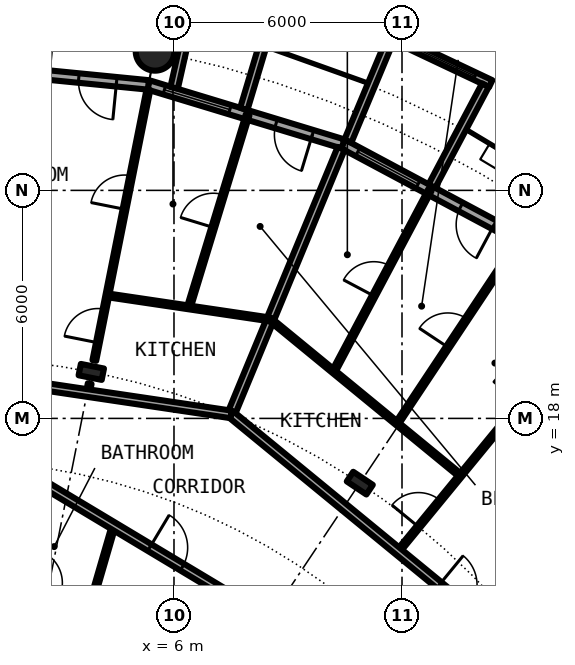
"""IFC4 building model, lengths in metres.
Left out: names, types, materials, properties, quantities, classifications, styles, units other than length and angle.
Written with IfcOpenShell. Run it as: python <this file> out.ifc"""

import sys

from ifc_helpers import new_model, si_unit, direction, frame, frame_2d, origin, origin_2d, place, context, subcontext, project, spatial, rectangle, circle, hollow_circle, i_section, extrude, element, fill, save


model = new_model("IFC4")
c1 = context("Model", 3, precision=1e-05, world=origin(), true_north=direction((0.0, 1.0)))
c2 = subcontext(c1, "Body", "Model", "MODEL_VIEW")
j1 = project(units=[si_unit("LENGTHUNIT", "METRE"), si_unit("PLANEANGLEUNIT", "RADIAN")], contexts=[c1])
p1 = place(None, origin())
s1 = spatial("IfcSite", under=j1, at=p1, CompositionType="ELEMENT")
p2 = place(p1, origin())
s2 = spatial("IfcBuilding", under=s1, at=p2, CompositionType="ELEMENT")
p3 = place(p2, frame((0.0, 0.0, 50.25)))
s3 = spatial("IfcBuildingStorey", under=s2, at=p3, CompositionType="ELEMENT", Elevation=50.25)
p4 = place(p3, frame((5.501, 27.658, 0.0), z_axis=(0.0, 0.0, 1.0), x_axis=(1.0, 0.0, 0.0)))
e1 = element("IfcColumn", 1, at=p4, inside=s3, PredefinedType="COLUMN", context=c2, shape_type="SweptSolid", body=[
    extrude(hollow_circle(Radius=0.508, WallThickness=0.05, at=origin_2d()), origin(), (0.0, 0.0, 1.0), 3.05),
])
for number, where, z_axis, x_axis in (
    (2, (10.889, 16.297, 0.0), (0.0, 0.0, 1.0), (0.556, 0.831, 0.0)),
    (3, (3.824, 19.223, 0.0), (0.0, 0.0, 1.0), (0.195, 0.981, 0.0)),
):
    element("IfcColumn", number, at=place(p3, frame(where, z_axis=z_axis, x_axis=x_axis)), inside=s3, PredefinedType="COLUMN", context=c2, shape_type="SweptSolid", body=[
        extrude(i_section(OverallWidth=0.305, OverallDepth=0.62, WebThickness=0.021, FlangeThickness=0.04, FilletRadius=0.027, at=origin_2d()), origin(), (0.0, 0.0, 1.0), 3.05),
    ])
p5 = place(p3, frame((15.167, 22.699, 0.0), z_axis=(0.0, 0.0, 1.0), x_axis=(-0.881915646801, 0.471407246368, 0.0)))
e4 = element("IfcWall", 4, at=p5, inside=s3, PredefinedType="SOLIDWALL", context=c2, shape_type="SweptSolid", body=[
    extrude(rectangle(XDim=5.352, YDim=0.25, at=frame_2d((2.676, 0.0))), origin(), (0.0, 0.0, 1.0), 2.7),
])
p6 = place(p5, frame((0.841, 0.0, 0.0)))
e5 = element("IfcOpeningElement", 5, at=p6, cuts=e4, PredefinedType="OPENING", context=c2, shape_type="SweptSolid", body=[
    extrude(rectangle(XDim=1.0, YDim=2.2, at=frame_2d((0.5, 1.1))), frame((0.0, 0.135, 0.0), z_axis=(0.0, -1.0, 0.0), x_axis=(1.0, 0.0, 0.0)), (0.0, 0.0, 1.0), 0.27),
])
p7 = place(p5, frame((3.111, 0.0, 0.3)))
e6 = element("IfcOpeningElement", 6, at=p7, cuts=e4, PredefinedType="OPENING", context=c2, shape_type="SweptSolid", body=[
    extrude(rectangle(XDim=1.8, YDim=2.1, at=frame_2d((0.9, 1.05))), frame((0.0, 0.135, 0.0), z_axis=(0.0, -1.0, 0.0), x_axis=(1.0, 0.0, 0.0)), (0.0, 0.0, 1.0), 0.27),
])
p8 = place(p3, frame((14.335, 26.808, -0.03), z_axis=(0.0, 0.0, 1.0), x_axis=(-0.904000060331, 0.427532327342, 0.0)))
e7 = element("IfcWall", 7, at=p8, inside=s3, PredefinedType="SOLIDWALL", context=c2, shape_type="SweptSolid", body=[
    extrude(rectangle(XDim=2.993, YDim=0.2, at=frame_2d((1.497, 0.0))), origin(), (0.0, 0.0, 1.0), 2.73),
])
p9 = place(p8, frame((0.457, 0.0, 0.33)))
e8 = element("IfcOpeningElement", 8, at=p9, cuts=e7, PredefinedType="OPENING", context=c2, shape_type="SweptSolid", body=[
    extrude(circle(Radius=1.04, at=frame_2d((1.04, 1.04))), frame((0.0, 0.11, 0.0), z_axis=(0.0, -1.0, 0.0), x_axis=(1.0, 0.0, 0.0)), (0.0, 0.0, 1.0), 0.22),
])
p10 = place(p3, frame((12.787, 24.113, -0.03), z_axis=(0.0, 0.0, 1.0), x_axis=(0.468365282436, 0.883534924159, 0.0)))
e9 = element("IfcWall", 9, at=p10, inside=s3, PredefinedType="SOLIDWALL", context=c2, shape_type="SweptSolid", body=[
    extrude(rectangle(XDim=3.006, YDim=0.2, at=frame_2d((1.503, 0.0))), origin(), (0.0, 0.0, 1.0), 2.73),
])
p11 = place(p3, frame((10.575, 25.295, -0.03), z_axis=(0.0, 0.0, 1.0), x_axis=(0.385697364644, 0.922625353492, 0.0)))
e10 = element("IfcWall", 10, at=p11, inside=s3, PredefinedType="SOLIDWALL", context=c2, shape_type="SweptSolid", body=[
    extrude(rectangle(XDim=2.883, YDim=0.2, at=frame_2d((1.442, 0.0))), origin(), (0.0, 0.0, 1.0), 2.73),
])
p12 = place(p3, frame((10.447, 25.222, 0.0), z_axis=(0.0, 0.0, 1.0), x_axis=(-0.956965678721, 0.290201119486, 0.0)))
e11 = element("IfcWall", 11, at=p12, inside=s3, PredefinedType="SOLIDWALL", context=c2, shape_type="SweptSolid", body=[
    extrude(rectangle(XDim=5.351, YDim=0.25, at=frame_2d((2.676, 0.0))), origin(), (0.0, 0.0, 1.0), 2.7),
])
p13 = place(p12, frame((0.841, 0.0, 0.0)))
e12 = element("IfcOpeningElement", 12, at=p13, cuts=e11, PredefinedType="OPENING", context=c2, shape_type="SweptSolid", body=[
    extrude(rectangle(XDim=1.0, YDim=2.2, at=frame_2d((0.5, 1.1))), frame((0.0, 0.135, 0.0), z_axis=(0.0, -1.0, 0.0), x_axis=(1.0, 0.0, 0.0)), (0.0, 0.0, 1.0), 0.27),
])
p14 = place(p12, frame((3.111, 0.0, 0.3)))
e13 = element("IfcOpeningElement", 13, at=p14, cuts=e11, PredefinedType="OPENING", context=c2, shape_type="SweptSolid", body=[
    extrude(rectangle(XDim=1.8, YDim=2.1, at=frame_2d((0.9, 1.05))), frame((0.0, 0.135, 0.0), z_axis=(0.0, -1.0, 0.0), x_axis=(1.0, 0.0, 0.0)), (0.0, 0.0, 1.0), 0.27),
])
p15 = place(p3, frame((7.837, 26.144, -0.03), z_axis=(0.0, 0.0, 1.0), x_axis=(0.287064767992, 0.957911174889, 0.0)))
e14 = element("IfcWall", 14, at=p15, inside=s3, PredefinedType="SOLIDWALL", context=c2, shape_type="SweptSolid", body=[
    extrude(rectangle(XDim=3.006, YDim=0.2, at=frame_2d((1.503, 0.0))), origin(), (0.0, 0.0, 1.0), 2.73),
])
p16 = place(p3, frame((6.004, 26.7, -0.03), z_axis=(0.0, 0.0, 1.0), x_axis=(0.219609259383, 0.975587911566, 0.0)))
e15 = element("IfcWall", 15, at=p16, inside=s3, PredefinedType="SOLIDWALL", context=c2, shape_type="SweptSolid", body=[
    extrude(rectangle(XDim=2.933, YDim=0.2, at=frame_2d((1.466, 0.0))), origin(), (0.0, 0.0, 1.0), 2.73),
])
p17 = place(p3, frame((5.326, 26.775, 0.0), z_axis=(0.0, 0.0, 1.0), x_axis=(-0.995173996315, 0.098126026407, 0.0)))
e16 = element("IfcWall", 16, at=p17, inside=s3, PredefinedType="SOLIDWALL", context=c2, shape_type="SweptSolid", body=[
    extrude(rectangle(XDim=5.352, YDim=0.25, at=frame_2d((2.676, 0.0))), origin(), (0.0, 0.0, 1.0), 2.7),
])
p18 = place(p17, frame((0.841, 0.0, 0.0)))
e17 = element("IfcOpeningElement", 17, at=p18, cuts=e16, PredefinedType="OPENING", context=c2, shape_type="SweptSolid", body=[
    extrude(rectangle(XDim=1.0, YDim=2.2, at=frame_2d((0.5, 1.1))), frame((0.0, 0.135, 0.0), z_axis=(0.0, -1.0, 0.0), x_axis=(1.0, 0.0, 0.0)), (0.0, 0.0, 1.0), 0.27),
])
p19 = place(p17, frame((3.111, 0.0, 0.3)))
e18 = element("IfcOpeningElement", 18, at=p19, cuts=e16, PredefinedType="OPENING", context=c2, shape_type="SweptSolid", body=[
    extrude(rectangle(XDim=1.8, YDim=2.1, at=frame_2d((0.9, 1.05))), frame((0.0, 0.135, 0.0), z_axis=(0.0, -1.0, 0.0), x_axis=(1.0, 0.0, 0.0)), (0.0, 0.0, 1.0), 0.27),
])
p20 = place(p3, frame((2.586, 27.171, -0.03), z_axis=(0.0, 0.0, 1.0), x_axis=(0.094548432284, 0.995520262954, 0.0)))
e19 = element("IfcWall", 19, at=p20, inside=s3, PredefinedType="SOLIDWALL", context=c2, shape_type="SweptSolid", body=[
    extrude(rectangle(XDim=3.006, YDim=0.2, at=frame_2d((1.503, 0.0))), origin(), (0.0, 0.0, 1.0), 2.73),
])
p21 = place(p3, frame((3.706, 12.744, 0.0), z_axis=(0.0, 0.0, 1.0), x_axis=(0.279201466266, 0.960232545395, 0.0)))
e20 = element("IfcWall", 20, at=p21, inside=s3, PredefinedType="PARTITIONING", context=c2, shape_type="SweptSolid", body=[
    extrude(rectangle(XDim=2.524, YDim=0.1, at=frame_2d((1.262, 0.0))), origin(), (0.0, 0.0, 1.0), 2.7),
])
p22 = place(p3, frame((3.733, 18.667, 0.0), z_axis=(0.0, 0.0, 1.0), x_axis=(0.193340656307, 0.981131688724, 0.0)))
e21 = element("IfcWall", 21, at=p22, inside=s3, PredefinedType="PARTITIONING", context=c2, shape_type="SweptSolid", body=[
    extrude(rectangle(XDim=0.254, YDim=0.1, at=frame_2d((0.127, 0.0))), origin(), (0.0, 0.0, 1.0), 2.7),
])
p23 = place(p3, frame((3.904, 19.524, 0.0), z_axis=(0.0, 0.0, 1.0), x_axis=(0.195857618189, 0.980632343642, 0.0)))
e22 = element("IfcWall", 22, at=p23, inside=s3, PredefinedType="PARTITIONING", context=c2, shape_type="SweptSolid", body=[
    extrude(rectangle(XDim=7.265, YDim=0.1, at=frame_2d((3.632, 0.0))), origin(), (0.0, 0.0, 1.0), 2.7),
])
p24 = place(p23, frame((0.476, 0.0, 0.0)))
e23 = element("IfcOpeningElement", 23, at=p24, cuts=e22, PredefinedType="OPENING", context=c2, shape_type="SweptSolid", body=[
    extrude(rectangle(XDim=0.9, YDim=2.3, at=frame_2d((0.45, 1.15))), frame((0.0, 0.06, 0.0), z_axis=(0.0, -1.0, 0.0), x_axis=(1.0, 0.0, 0.0)), (0.0, 0.0, 1.0), 0.12),
])
p25 = place(p23, frame((4.058, 0.0, 0.0)))
e24 = element("IfcOpeningElement", 24, at=p25, cuts=e22, PredefinedType="OPENING", context=c2, shape_type="SweptSolid", body=[
    extrude(rectangle(XDim=0.9, YDim=2.3, at=frame_2d((0.45, 1.15))), frame((0.0, 0.06, 0.0), z_axis=(0.0, -1.0, 0.0), x_axis=(1.0, 0.0, 0.0)), (0.0, 0.0, 1.0), 0.12),
])
p26 = place(p3, frame((6.39, 20.921, 0.0), z_axis=(0.0, 0.0, 1.0), x_axis=(0.292081613207, 0.956393397732, 0.0)))
e25 = element("IfcWall", 25, at=p26, inside=s3, PredefinedType="PARTITIONING", context=c2, shape_type="SweptSolid", body=[
    extrude(rectangle(XDim=5.3, YDim=0.1, at=frame_2d((2.65, 0.0))), origin(), (0.0, 0.0, 1.0), 2.7),
])
p27 = place(p26, frame((2.2, 0.0, 0.0)))
e26 = element("IfcOpeningElement", 26, at=p27, cuts=e25, PredefinedType="OPENING", context=c2, shape_type="SweptSolid", body=[
    extrude(rectangle(XDim=0.9, YDim=2.3, at=frame_2d((0.45, 1.15))), frame((0.0, 0.06, 0.0), z_axis=(0.0, -1.0, 0.0), x_axis=(1.0, 0.0, 0.0)), (0.0, 0.0, 1.0), 0.12),
])
p28 = place(p3, frame((7.501, 18.108, 0.0), z_axis=(0.0, 0.0, 1.0), x_axis=(0.382600411313, 0.923913916587, 0.0)))
e27 = element("IfcWall", 27, at=p28, inside=s3, PredefinedType="PARTITIONING", context=c2, shape_type="SweptSolid", body=[
    extrude(rectangle(XDim=7.574, YDim=0.2, at=frame_2d((3.787, 0.0))), origin(), (0.0, 0.0, 1.0), 2.7),
])
p29 = place(p3, frame((10.202, 19.234, 0.0), z_axis=(0.0, 0.0, 1.0), x_axis=(0.468610030042, 0.883405139075, 0.0)))
e28 = element("IfcWall", 28, at=p29, inside=s3, PredefinedType="PARTITIONING", context=c2, shape_type="SweptSolid", body=[
    extrude(rectangle(XDim=5.403, YDim=0.1, at=frame_2d((2.702, 0.0))), origin(), (0.0, 0.0, 1.0), 2.7),
])
p30 = place(p29, frame((2.252, 0.0, 0.0)))
e29 = element("IfcOpeningElement", 29, at=p30, cuts=e28, PredefinedType="OPENING", context=c2, shape_type="SweptSolid", body=[
    extrude(rectangle(XDim=0.9, YDim=2.3, at=frame_2d((0.45, 1.15))), frame((0.0, 0.06, 0.0), z_axis=(0.0, -1.0, 0.0), x_axis=(1.0, 0.0, 0.0)), (0.0, 0.0, 1.0), 0.12),
])
p31 = place(p3, frame((11.87, 17.865, 0.0), z_axis=(0.0, 0.0, 1.0), x_axis=(0.553440102418, 0.832888980018, 0.0)))
e30 = element("IfcWall", 30, at=p31, inside=s3, PredefinedType="PARTITIONING", context=c2, shape_type="SweptSolid", body=[
    extrude(rectangle(XDim=5.726, YDim=0.1, at=frame_2d((2.863, 0.0))), origin(), (0.0, 0.0, 1.0), 2.7),
])
p32 = place(p31, frame((2.413, 0.0, 0.0)))
e31 = element("IfcOpeningElement", 31, at=p32, cuts=e30, PredefinedType="OPENING", context=c2, shape_type="SweptSolid", body=[
    extrude(rectangle(XDim=0.9, YDim=2.3, at=frame_2d((0.45, 1.15))), frame((0.0, 0.06, 0.0), z_axis=(0.0, -1.0, 0.0), x_axis=(1.0, 0.0, 0.0)), (0.0, 0.0, 1.0), 0.12),
])
p33 = place(p3, frame((11.899, 14.499, 0.0), z_axis=(0.0, 0.0, 1.0), x_axis=(0.634396151441, 0.77300810024, 0.0)))
e32 = element("IfcWall", 32, at=p33, inside=s3, PredefinedType="PARTITIONING", context=c2, shape_type="SweptSolid", body=[
    extrude(rectangle(XDim=8.419, YDim=0.1, at=frame_2d((4.209, 0.0))), origin(), (0.0, 0.0, 1.0), 2.7),
])
p34 = place(p33, frame((0.84, 0.0, 0.0)))
e33 = element("IfcOpeningElement", 33, at=p34, cuts=e32, PredefinedType="OPENING", context=c2, shape_type="SweptSolid", body=[
    extrude(rectangle(XDim=0.9, YDim=2.3, at=frame_2d((0.45, 1.15))), frame((0.0, 0.06, 0.0), z_axis=(0.0, -1.0, 0.0), x_axis=(1.0, 0.0, 0.0)), (0.0, 0.0, 1.0), 0.12),
])
p35 = place(p33, frame((5.051, 0.0, 0.0)))
e34 = element("IfcOpeningElement", 34, at=p35, cuts=e32, PredefinedType="OPENING", context=c2, shape_type="SweptSolid", body=[
    extrude(rectangle(XDim=0.9, YDim=2.3, at=frame_2d((0.45, 1.15))), frame((0.0, 0.06, 0.0), z_axis=(0.0, -1.0, 0.0), x_axis=(1.0, 0.0, 0.0)), (0.0, 0.0, 1.0), 0.12),
])
p36 = place(p3, frame((1.392, 14.132, 0.0), z_axis=(0.0, 0.0, 1.0), x_axis=(0.857524856518, -0.514442533674, 0.0)))
e35 = element("IfcWall", 35, at=p36, inside=s3, PredefinedType="PARTITIONING", context=c2, shape_type="SweptSolid", body=[
    extrude(rectangle(XDim=2.698, YDim=0.1, at=frame_2d((1.349, 0.0))), origin(), (0.0, 0.0, 1.0), 2.7),
])
p37 = place(p36, frame((0.899, 0.0, 0.0)))
e36 = element("IfcOpeningElement", 36, at=p37, cuts=e35, PredefinedType="OPENING", context=c2, shape_type="SweptSolid", body=[
    extrude(rectangle(XDim=0.9, YDim=2.3, at=frame_2d((0.45, 1.15))), frame((0.0, 0.06, 0.0), z_axis=(0.0, -1.0, 0.0), x_axis=(1.0, 0.0, 0.0)), (0.0, 0.0, 1.0), 0.12),
])
p38 = place(p3, frame((1.658, 16.819, 0.0), z_axis=(0.0, 0.0, 1.0), x_axis=(0.857688434449, -0.514169767113, 0.0)))
e37 = element("IfcWall", 37, at=p38, inside=s3, PredefinedType="PARTITIONING", context=c2, shape_type="SweptSolid", body=[
    extrude(rectangle(XDim=14.429, YDim=0.2, at=frame_2d((7.215, 0.0))), origin(), (0.0, 0.0, 1.0), 2.7),
])
p39 = place(p38, frame((4.316, 0.0, 0.0)))
e38 = element("IfcOpeningElement", 38, at=p39, cuts=e37, PredefinedType="OPENING", context=c2, shape_type="SweptSolid", body=[
    extrude(rectangle(XDim=1.0, YDim=2.3, at=frame_2d((0.5, 1.15))), frame((0.0, 0.11, 0.0), z_axis=(0.0, -1.0, 0.0), x_axis=(1.0, 0.0, 0.0)), (0.0, 0.0, 1.0), 0.22),
])
p40 = place(p3, frame((7.5, 18.108, 0.0), z_axis=(0.0, 0.0, 1.0), x_axis=(0.773041360816, -0.634355621452, 0.0)))
e39 = element("IfcWall", 39, at=p40, inside=s3, PredefinedType="PARTITIONING", context=c2, shape_type="SweptSolid", body=[
    extrude(rectangle(XDim=11.221, YDim=0.2, at=frame_2d((5.61, 0.0))), origin(), (0.0, 0.0, 1.0), 2.38),
])
p41 = place(p40, frame((7.083, 0.0, 0.0)))
e40 = element("IfcOpeningElement", 40, at=p41, cuts=e39, PredefinedType="OPENING", context=c2, shape_type="SweptSolid", body=[
    extrude(rectangle(XDim=1.0, YDim=2.3, at=frame_2d((0.5, 1.15))), frame((0.0, 0.11, 0.0), z_axis=(0.0, -1.0, 0.0), x_axis=(1.0, 0.0, 0.0)), (0.0, 0.0, 1.0), 0.22),
])
p42 = place(p3, frame((-1.921, 19.506, 0.0), z_axis=(0.0, 0.0, 1.0), x_axis=(0.989134446023, -0.147013767014, 0.0)))
e41 = element("IfcWall", 41, at=p42, inside=s3, PredefinedType="PARTITIONING", context=c2, shape_type="SweptSolid", body=[
    extrude(rectangle(XDim=9.531, YDim=0.2, at=frame_2d((4.765, 0.0))), origin(), (0.0, 0.0, 1.0), 2.38),
])
p43 = place(p42, frame((3.31, 0.0, 0.0)))
e42 = element("IfcOpeningElement", 42, at=p43, cuts=e41, PredefinedType="OPENING", context=c2, shape_type="SweptSolid", body=[
    extrude(rectangle(XDim=1.0, YDim=2.3, at=frame_2d((0.5, 1.15))), frame((0.0, 0.11, 0.0), z_axis=(0.0, -1.0, 0.0), x_axis=(1.0, 0.0, 0.0)), (0.0, 0.0, 1.0), 0.22),
])
p44 = place(p3, frame((8.534, 20.603, 0.0), z_axis=(0.0, 0.0, 1.0), x_axis=(0.773000340237, -0.634405606843, 0.0)))
e43 = element("IfcWall", 43, at=p44, inside=s3, PredefinedType="PARTITIONING", context=c2, shape_type="SweptSolid", body=[
    extrude(rectangle(XDim=6.474, YDim=0.1, at=frame_2d((3.237, 0.0))), origin(), (0.0, 0.0, 1.0), 2.7),
])
p45 = place(p3, frame((4.246, 21.239, 0.0), z_axis=(0.0, 0.0, 1.0), x_axis=(0.989178348771, -0.146718077695, 0.0)))
e44 = element("IfcWall", 44, at=p45, inside=s3, PredefinedType="PARTITIONING", context=c2, shape_type="SweptSolid", body=[
    extrude(rectangle(XDim=4.335, YDim=0.1, at=frame_2d((2.167, 0.0))), origin(), (0.0, 0.0, 1.0), 2.7),
])
p46 = place(p6, origin())
e45 = element("IfcDoor", 45, at=p46, inside=s3, OperationType="SINGLE_SWING_LEFT", PredefinedType="DOOR", context=c2, shape_type="SweptSolid", body=[
    extrude(rectangle(XDim=1.0, YDim=2.2, at=frame_2d((0.5, 1.1))), frame((0.0, 0.025, 0.0), z_axis=(0.0, -1.0, 0.0), x_axis=(1.0, 0.0, 0.0)), (0.0, 0.0, 1.0), 0.05),
])
fill(e5, e45)
p47 = place(p7, origin())
e46 = element("IfcWindow", 46, at=p47, inside=s3, PartitioningType="SINGLE_PANEL", PredefinedType="WINDOW", context=c2, shape_type="SweptSolid", body=[
    extrude(rectangle(XDim=1.8, YDim=2.1, at=frame_2d((0.9, 1.05))), frame((0.0, 0.03, 0.0), z_axis=(0.0, -1.0, 0.0), x_axis=(1.0, 0.0, 0.0)), (0.0, 0.0, 1.0), 0.06),
])
fill(e6, e46)
p48 = place(p9, origin())
e47 = element("IfcWindow", 47, at=p48, inside=s3, PartitioningType="SINGLE_PANEL", PredefinedType="WINDOW", context=c2, shape_type="SweptSolid", body=[
    extrude(circle(Radius=1.04, at=frame_2d((1.04, 1.04))), frame((0.0, 0.03, 0.0), z_axis=(0.0, -1.0, 0.0), x_axis=(1.0, 0.0, 0.0)), (0.0, 0.0, 1.0), 0.06),
])
fill(e8, e47)
p49 = place(p13, origin())
e48 = element("IfcDoor", 48, at=p49, inside=s3, OperationType="SINGLE_SWING_LEFT", PredefinedType="DOOR", context=c2, shape_type="SweptSolid", body=[
    extrude(rectangle(XDim=1.0, YDim=2.2, at=frame_2d((0.5, 1.1))), frame((0.0, 0.025, 0.0), z_axis=(0.0, -1.0, 0.0), x_axis=(1.0, 0.0, 0.0)), (0.0, 0.0, 1.0), 0.05),
])
fill(e12, e48)
p50 = place(p14, origin())
e49 = element("IfcWindow", 49, at=p50, inside=s3, PartitioningType="SINGLE_PANEL", PredefinedType="WINDOW", context=c2, shape_type="SweptSolid", body=[
    extrude(rectangle(XDim=1.8, YDim=2.1, at=frame_2d((0.9, 1.05))), frame((0.0, 0.03, 0.0), z_axis=(0.0, -1.0, 0.0), x_axis=(1.0, 0.0, 0.0)), (0.0, 0.0, 1.0), 0.06),
])
fill(e13, e49)
p51 = place(p18, origin())
e50 = element("IfcDoor", 50, at=p51, inside=s3, OperationType="SINGLE_SWING_LEFT", PredefinedType="DOOR", context=c2, shape_type="SweptSolid", body=[
    extrude(rectangle(XDim=1.0, YDim=2.2, at=frame_2d((0.5, 1.1))), frame((0.0, 0.025, 0.0), z_axis=(0.0, -1.0, 0.0), x_axis=(1.0, 0.0, 0.0)), (0.0, 0.0, 1.0), 0.05),
])
fill(e17, e50)
p52 = place(p41, origin())
e51 = element("IfcDoor", 51, at=p52, inside=s3, OperationType="SINGLE_SWING_RIGHT", PredefinedType="DOOR", context=c2, shape_type="SweptSolid", body=[
    extrude(rectangle(XDim=1.0, YDim=2.3, at=frame_2d((0.5, 1.15))), frame((0.0, 0.025, 0.0), z_axis=(0.0, -1.0, 0.0), x_axis=(1.0, 0.0, 0.0)), (0.0, 0.0, 1.0), 0.05),
])
fill(e40, e51)
p53 = place(p34, origin())
e52 = element("IfcDoor", 52, at=p53, inside=s3, OperationType="SINGLE_SWING_LEFT", PredefinedType="DOOR", context=c2, shape_type="SweptSolid", body=[
    extrude(rectangle(XDim=0.9, YDim=2.3, at=frame_2d((0.45, 1.15))), frame((0.0, 0.025, 0.0), z_axis=(0.0, -1.0, 0.0), x_axis=(1.0, 0.0, 0.0)), (0.0, 0.0, 1.0), 0.05),
])
fill(e33, e52)
p54 = place(p32, origin())
e53 = element("IfcDoor", 53, at=p54, inside=s3, OperationType="SINGLE_SWING_LEFT", PredefinedType="DOOR", context=c2, shape_type="SweptSolid", body=[
    extrude(rectangle(XDim=0.9, YDim=2.3, at=frame_2d((0.45, 1.15))), frame((0.0, 0.025, 0.0), z_axis=(0.0, -1.0, 0.0), x_axis=(1.0, 0.0, 0.0)), (0.0, 0.0, 1.0), 0.05),
])
fill(e31, e53)
p55 = place(p30, origin())
e54 = element("IfcDoor", 54, at=p55, inside=s3, OperationType="SINGLE_SWING_LEFT", PredefinedType="DOOR", context=c2, shape_type="SweptSolid", body=[
    extrude(rectangle(XDim=0.9, YDim=2.3, at=frame_2d((0.45, 1.15))), frame((0.0, 0.025, 0.0), z_axis=(0.0, -1.0, 0.0), x_axis=(1.0, 0.0, 0.0)), (0.0, 0.0, 1.0), 0.05),
])
fill(e29, e54)
p56 = place(p24, origin())
e55 = element("IfcDoor", 55, at=p56, inside=s3, OperationType="SINGLE_SWING_LEFT", PredefinedType="DOOR", context=c2, shape_type="SweptSolid", body=[
    extrude(rectangle(XDim=0.9, YDim=2.3, at=frame_2d((0.45, 1.15))), frame((0.0, 0.025, 0.0), z_axis=(0.0, -1.0, 0.0), x_axis=(1.0, 0.0, 0.0)), (0.0, 0.0, 1.0), 0.05),
])
fill(e23, e55)
p57 = place(p25, origin())
e56 = element("IfcDoor", 56, at=p57, inside=s3, OperationType="SINGLE_SWING_RIGHT", PredefinedType="DOOR", context=c2, shape_type="SweptSolid", body=[
    extrude(rectangle(XDim=0.9, YDim=2.3, at=frame_2d((0.45, 1.15))), frame((0.0, 0.025, 0.0), z_axis=(0.0, -1.0, 0.0), x_axis=(1.0, 0.0, 0.0)), (0.0, 0.0, 1.0), 0.05),
])
fill(e24, e56)
p58 = place(p27, origin())
e57 = element("IfcDoor", 57, at=p58, inside=s3, OperationType="SINGLE_SWING_LEFT", PredefinedType="DOOR", context=c2, shape_type="SweptSolid", body=[
    extrude(rectangle(XDim=0.9, YDim=2.3, at=frame_2d((0.45, 1.15))), frame((0.0, 0.025, 0.0), z_axis=(0.0, -1.0, 0.0), x_axis=(1.0, 0.0, 0.0)), (0.0, 0.0, 1.0), 0.05),
])
fill(e26, e57)
p59 = place(p39, origin())
e58 = element("IfcDoor", 58, at=p59, inside=s3, OperationType="SINGLE_SWING_LEFT", PredefinedType="DOOR", context=c2, shape_type="SweptSolid", body=[
    extrude(rectangle(XDim=1.0, YDim=2.3, at=frame_2d((0.5, 1.15))), frame((0.0, 0.025, 0.0), z_axis=(0.0, -1.0, 0.0), x_axis=(1.0, 0.0, 0.0)), (0.0, 0.0, 1.0), 0.05),
])
fill(e38, e58)
p60 = place(p37, origin())
e59 = element("IfcDoor", 59, at=p60, inside=s3, OperationType="SINGLE_SWING_RIGHT", PredefinedType="DOOR", context=c2, shape_type="SweptSolid", body=[
    extrude(rectangle(XDim=0.9, YDim=2.3, at=frame_2d((0.45, 1.15))), frame((0.0, 0.025, 0.0), z_axis=(0.0, -1.0, 0.0), x_axis=(1.0, 0.0, 0.0)), (0.0, 0.0, 1.0), 0.05),
])
fill(e36, e59)
save(model, sys.argv[1])
